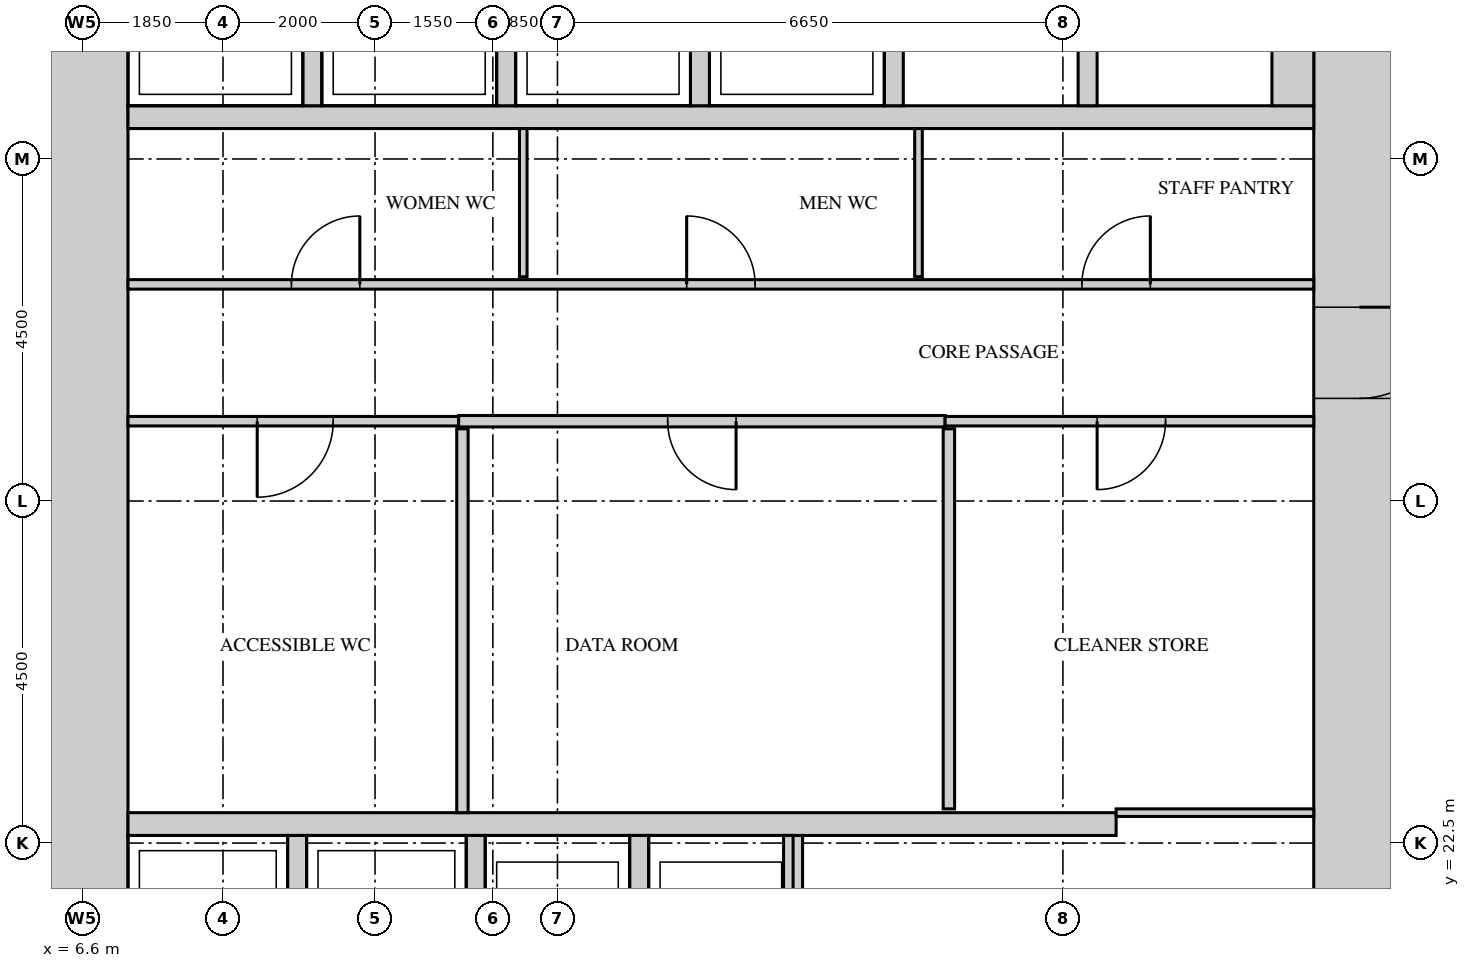
"""IFC4 building model, lengths in metres.
Left out: names, types, materials, properties, quantities, classifications, styles, units other than length and angle.
Written with IfcOpenShell. Run it as: python <this file> out.ifc"""

import sys

from ifc_helpers import new_model, si_unit, direction, frame, frame_2d, origin, place, context, subcontext, project, spatial, rectangle, extrude, source, transform, mapped, element, fill, save


model = new_model("IFC4")
c1 = context("Model", 3, precision=1e-05, world=origin(), true_north=direction((0.0, 1.0)))
c2 = subcontext(c1, "Body", "Model", "MODEL_VIEW")
j1 = project(units=[si_unit("LENGTHUNIT", "METRE"), si_unit("PLANEANGLEUNIT", "RADIAN")], contexts=[c1])
p1 = place(None, origin())
s1 = spatial("IfcSite", under=j1, at=p1, CompositionType="ELEMENT")
p2 = place(p1, origin())
s2 = spatial("IfcBuilding", under=s1, at=p2, CompositionType="ELEMENT")
p3 = place(p2, frame((0.0, 0.0, 51.0)))
s3 = spatial("IfcBuildingStorey", under=s2, at=p3, CompositionType="ELEMENT", Elevation=51.0)
m1 = source(origin(), c2, "Body", "SweptSolid", [
    extrude(rectangle(XDim=27.6, YDim=1.2, at=frame_2d((13.8, 0.0))), origin(), (0.0, 0.0, 1.0), 4.2),
])
p4 = place(p3, frame((23.4, 13.2, 0.0), z_axis=(0.0, 0.0, 1.0), x_axis=(0.0, 1.0, 0.0)))
e1 = element("IfcWall", 1, at=p4, inside=s3, PredefinedType="SHEAR", context=c2, shape_type="MappedRepresentation", body=[
    mapped(m1, transform((0.0, 0.0, 0.0))),
])
m2 = source(origin(), c2, "Body", "SweptSolid", [
    extrude(rectangle(XDim=1.8, YDim=2.1, at=frame_2d((0.9, 1.05))), frame((0.0, 0.61, 0.0), z_axis=(0.0, -1.0, 0.0), x_axis=(1.0, 0.0, 0.0)), (0.0, 0.0, 1.0), 1.22),
])
p5 = place(p4, frame((22.4, 0.0, 0.0)))
e2 = element("IfcOpeningElement", 2, at=p5, cuts=e1, PredefinedType="OPENING", context=c2, shape_type="MappedRepresentation", body=[
    mapped(m2, transform((0.0, 0.0, 0.0))),
])
m3 = source(origin(), c2, "Body", "SweptSolid", [
    extrude(rectangle(XDim=1.2, YDim=2.1, at=frame_2d((0.6, 1.05))), frame((0.0, 0.61, 0.0), z_axis=(0.0, -1.0, 0.0), x_axis=(1.0, 0.0, 0.0)), (0.0, 0.0, 1.0), 1.22),
])
p6 = place(p4, frame((15.15, 0.0, 0.0)))
e3 = element("IfcOpeningElement", 3, at=p6, cuts=e1, PredefinedType="OPENING", context=c2, shape_type="MappedRepresentation", body=[
    mapped(m3, transform((0.0, 0.0, 0.0))),
])
m4 = source(origin(), c2, "Body", "SweptSolid", [
    extrude(rectangle(XDim=0.9, YDim=2.1, at=frame_2d((0.45, 1.05))), frame((0.0, 0.61, 0.0), z_axis=(0.0, -1.0, 0.0), x_axis=(1.0, 0.0, 0.0)), (0.0, 0.0, 1.0), 1.22),
])
p7 = place(p4, frame((1.15, 0.0, 0.0)))
e4 = element("IfcOpeningElement", 4, at=p7, cuts=e1, PredefinedType="OPENING", context=c2, shape_type="MappedRepresentation", body=[
    mapped(m4, transform((0.0, 0.0, 0.0))),
])
p8 = place(p4, frame((4.35, 0.0, 0.0)))
e5 = element("IfcOpeningElement", 5, at=p8, cuts=e1, PredefinedType="OPENING", context=c2, shape_type="MappedRepresentation", body=[
    mapped(m4, transform((0.0, 0.0, 0.0))),
])
p9 = place(p4, frame((7.6, 0.0, 0.0)))
e6 = element("IfcOpeningElement", 6, at=p9, cuts=e1, PredefinedType="OPENING", context=c2, shape_type="MappedRepresentation", body=[
    mapped(m4, transform((0.0, 0.0, 0.0))),
])
p10 = place(p3, frame((6.6, 13.2, 0.0), z_axis=(0.0, 0.0, 1.0), x_axis=(0.0, 1.0, 0.0)))
e7 = element("IfcWall", 7, at=p10, inside=s3, PredefinedType="SHEAR", context=c2, shape_type="MappedRepresentation", body=[
    mapped(m1, transform((0.0, 0.0, 0.0))),
])
m5 = source(origin(), c2, "Body", "SweptSolid", [
    extrude(rectangle(XDim=13.0, YDim=0.3, at=frame_2d((6.5, 0.0))), origin(), (0.0, 0.0, 1.0), 4.2),
])
p11 = place(p3, frame((7.2, 22.75, 0.0), z_axis=(0.0, 0.0, 1.0), x_axis=(1.0, 0.0, 0.0)))
e8 = element("IfcWall", 8, at=p11, inside=s3, PredefinedType="STANDARD", context=c2, shape_type="MappedRepresentation", body=[
    mapped(m5, transform((0.0, 0.0, 0.0))),
])
m6 = source(origin(), c2, "Body", "SweptSolid", [
    extrude(rectangle(XDim=15.6, YDim=0.3, at=frame_2d((7.8, 0.0))), origin(), (0.0, 0.0, 1.0), 4.2),
])
p12 = place(p3, frame((7.2, 32.05, 0.0), z_axis=(0.0, 0.0, 1.0), x_axis=(1.0, 0.0, 0.0)))
e9 = element("IfcWall", 9, at=p12, inside=s3, PredefinedType="STANDARD", context=c2, shape_type="MappedRepresentation", body=[
    mapped(m6, transform((0.0, 0.0, 0.0))),
])
m7 = source(origin(), c2, "Body", "SweptSolid", [
    extrude(rectangle(XDim=3.1, YDim=0.25, at=frame_2d((1.55, 0.0))), origin(), (0.0, 0.0, 1.0), 4.2),
])
for number, where, z_axis, x_axis in (
    (10, (9.425, 19.5, 0.0), (0.0, 0.0, 1.0), (0.0, 1.0, 0.0)),
    (11, (11.775, 19.5, 0.0), (0.0, 0.0, 1.0), (0.0, 1.0, 0.0)),
    (12, (13.925, 19.5, 0.0), (0.0, 0.0, 1.0), (0.0, 1.0, 0.0)),
    (13, (15.95, 19.5, 0.0), (0.0, 0.0, 1.0), (0.0, 1.0, 0.0)),
):
    element("IfcWall", number, at=place(p3, frame(where, z_axis=z_axis, x_axis=x_axis)), inside=s3, PredefinedType="STANDARD", context=c2, shape_type="MappedRepresentation", body=[
        mapped(m7, transform((0.0, 0.0, 0.0))),
    ])
m8 = source(origin(), c2, "Body", "SweptSolid", [
    extrude(rectangle(XDim=2.4, YDim=0.25, at=frame_2d((1.2, 0.0))), origin(), (0.0, 0.0, 1.0), 4.2),
])
for number, where, z_axis, x_axis in (
    (14, (9.625, 32.2, 0.0), (0.0, 0.0, 1.0), (0.0, 1.0, 0.0)),
    (15, (12.175, 32.2, 0.0), (0.0, 0.0, 1.0), (0.0, 1.0, 0.0)),
    (16, (14.725, 32.2, 0.0), (0.0, 0.0, 1.0), (0.0, 1.0, 0.0)),
    (17, (17.275, 32.2, 0.0), (0.0, 0.0, 1.0), (0.0, 1.0, 0.0)),
    (18, (19.825, 32.2, 0.0), (0.0, 0.0, 1.0), (0.0, 1.0, 0.0)),
):
    element("IfcWall", number, at=place(p3, frame(where, z_axis=z_axis, x_axis=x_axis)), inside=s3, PredefinedType="STANDARD", context=c2, shape_type="MappedRepresentation", body=[
        mapped(m8, transform((0.0, 0.0, 0.0))),
    ])
m9 = source(origin(), c2, "Body", "SweptSolid", [
    extrude(rectangle(XDim=2.4, YDim=0.55, at=frame_2d((1.2, 0.0))), origin(), (0.0, 0.0, 1.0), 4.2),
])
p13 = place(p3, frame((22.525, 32.2, 0.0), z_axis=(0.0, 0.0, 1.0), x_axis=(0.0, 1.0, 0.0)))
e19 = element("IfcWall", 19, at=p13, inside=s3, PredefinedType="STANDARD", context=c2, shape_type="MappedRepresentation", body=[
    mapped(m9, transform((0.0, 0.0, 0.0))),
])
m10 = source(origin(), c2, "Body", "SweptSolid", [
    extrude(rectangle(XDim=5.05, YDim=0.15, at=frame_2d((2.525, 0.0))), origin(), (0.0, 0.0, 1.0), 4.3),
])
p14 = place(p3, frame((11.6, 22.9, 0.0), z_axis=(0.0, 0.0, 1.0), x_axis=(0.0, 1.0, 0.0)))
e20 = element("IfcWall", 20, at=p14, inside=s3, PredefinedType="PARTITIONING", context=c2, shape_type="MappedRepresentation", body=[
    mapped(m10, transform((0.0, 0.0, 0.0))),
])
m11 = source(origin(), c2, "Body", "SweptSolid", [
    extrude(rectangle(XDim=2.6, YDim=0.1, at=frame_2d((1.3, 0.0))), origin(), (0.0, 0.0, 1.0), 4.3),
])
p15 = place(p3, frame((20.2, 22.9, 0.0), z_axis=(0.0, 0.0, 1.0), x_axis=(1.0, 0.0, 0.0)))
e21 = element("IfcWall", 21, at=p15, inside=s3, PredefinedType="PARTITIONING", context=c2, shape_type="MappedRepresentation", body=[
    mapped(m11, transform((0.0, 0.0, 0.0))),
])
m12 = source(origin(), c2, "Body", "SweptSolid", [
    extrude(rectangle(XDim=5.0, YDim=0.15, at=frame_2d((2.5, 0.0))), origin(), (0.0, 0.0, 1.0), 4.3),
])
p16 = place(p3, frame((18.0, 22.95, 0.0), z_axis=(0.0, 0.0, 1.0), x_axis=(0.0, 1.0, 0.0)))
e22 = element("IfcWall", 22, at=p16, inside=s3, PredefinedType="PARTITIONING", context=c2, shape_type="MappedRepresentation", body=[
    mapped(m12, transform((0.0, 0.0, 0.0))),
])
m13 = source(origin(), c2, "Body", "SweptSolid", [
    extrude(rectangle(XDim=4.35, YDim=0.125, at=frame_2d((2.175, 0.0))), origin(), (0.0, 0.0, 1.0), 4.3),
])
p17 = place(p3, frame((7.2, 28.05, 0.0), z_axis=(0.0, 0.0, 1.0), x_axis=(1.0, 0.0, 0.0)))
e23 = element("IfcWall", 23, at=p17, inside=s3, PredefinedType="PARTITIONING", context=c2, shape_type="MappedRepresentation", body=[
    mapped(m13, transform((0.0, 0.0, 0.0))),
])
m14 = source(origin(), c2, "Body", "SweptSolid", [
    extrude(rectangle(XDim=1.0, YDim=2.1, at=frame_2d((0.5, 1.05))), frame((0.0, 0.073, 0.0), z_axis=(0.0, -1.0, 0.0), x_axis=(1.0, 0.0, 0.0)), (0.0, 0.0, 1.0), 0.145),
])
p18 = place(p17, frame((1.7, 0.0, 0.0)))
e24 = element("IfcOpeningElement", 24, at=p18, cuts=e23, PredefinedType="OPENING", context=c2, shape_type="MappedRepresentation", body=[
    mapped(m14, transform((0.0, 0.0, 0.0))),
])
m15 = source(origin(), c2, "Body", "SweptSolid", [
    extrude(rectangle(XDim=6.4, YDim=0.15, at=frame_2d((3.2, 0.0))), origin(), (0.0, 0.0, 1.0), 4.3),
])
p19 = place(p3, frame((11.55, 28.05, 0.0), z_axis=(0.0, 0.0, 1.0), x_axis=(1.0, 0.0, 0.0)))
e25 = element("IfcWall", 25, at=p19, inside=s3, PredefinedType="PARTITIONING", context=c2, shape_type="MappedRepresentation", body=[
    mapped(m15, transform((0.0, 0.0, 0.0))),
])
m16 = source(origin(), c2, "Body", "SweptSolid", [
    extrude(rectangle(XDim=0.9, YDim=2.1, at=frame_2d((0.45, 1.05))), frame((0.0, 0.085, 0.0), z_axis=(0.0, -1.0, 0.0), x_axis=(1.0, 0.0, 0.0)), (0.0, 0.0, 1.0), 0.17),
])
p20 = place(p19, frame((2.75, 0.0, 0.0)))
e26 = element("IfcOpeningElement", 26, at=p20, cuts=e25, PredefinedType="OPENING", context=c2, shape_type="MappedRepresentation", body=[
    mapped(m16, transform((0.0, 0.0, 0.0))),
])
m17 = source(origin(), c2, "Body", "SweptSolid", [
    extrude(rectangle(XDim=4.85, YDim=0.125, at=frame_2d((2.425, 0.0))), origin(), (0.0, 0.0, 1.0), 4.3),
])
p21 = place(p3, frame((17.95, 28.05, 0.0), z_axis=(0.0, 0.0, 1.0), x_axis=(1.0, 0.0, 0.0)))
e27 = element("IfcWall", 27, at=p21, inside=s3, PredefinedType="PARTITIONING", context=c2, shape_type="MappedRepresentation", body=[
    mapped(m17, transform((0.0, 0.0, 0.0))),
])
m18 = source(origin(), c2, "Body", "SweptSolid", [
    extrude(rectangle(XDim=0.9, YDim=2.1, at=frame_2d((0.45, 1.05))), frame((0.0, 0.073, 0.0), z_axis=(0.0, -1.0, 0.0), x_axis=(1.0, 0.0, 0.0)), (0.0, 0.0, 1.0), 0.145),
])
p22 = place(p21, frame((2.0, 0.0, 0.0)))
e28 = element("IfcOpeningElement", 28, at=p22, cuts=e27, PredefinedType="OPENING", context=c2, shape_type="MappedRepresentation", body=[
    mapped(m18, transform((0.0, 0.0, 0.0))),
])
m19 = source(origin(), c2, "Body", "SweptSolid", [
    extrude(rectangle(XDim=15.6, YDim=0.125, at=frame_2d((7.8, 0.0))), origin(), (0.0, 0.0, 1.0), 4.3),
])
p23 = place(p3, frame((7.2, 29.85, 0.0), z_axis=(0.0, 0.0, 1.0), x_axis=(1.0, 0.0, 0.0)))
e29 = element("IfcWall", 29, at=p23, inside=s3, PredefinedType="PARTITIONING", context=c2, shape_type="MappedRepresentation", body=[
    mapped(m19, transform((0.0, 0.0, 0.0))),
])
p24 = place(p23, frame((2.15, 0.0, 0.0)))
e30 = element("IfcOpeningElement", 30, at=p24, cuts=e29, PredefinedType="OPENING", context=c2, shape_type="MappedRepresentation", body=[
    mapped(m18, transform((0.0, 0.0, 0.0))),
])
p25 = place(p23, frame((7.35, 0.0, 0.0)))
e31 = element("IfcOpeningElement", 31, at=p25, cuts=e29, PredefinedType="OPENING", context=c2, shape_type="MappedRepresentation", body=[
    mapped(m18, transform((0.0, 0.0, 0.0))),
])
p26 = place(p23, frame((12.55, 0.0, 0.0)))
e32 = element("IfcOpeningElement", 32, at=p26, cuts=e29, PredefinedType="OPENING", context=c2, shape_type="MappedRepresentation", body=[
    mapped(m18, transform((0.0, 0.0, 0.0))),
])
m20 = source(origin(), c2, "Body", "SweptSolid", [
    extrude(rectangle(XDim=1.95, YDim=0.1, at=frame_2d((0.975, 0.0))), origin(), (0.0, 0.0, 1.0), 4.3),
])
for number, where, z_axis, x_axis in (
    (33, (12.4, 29.95, 0.0), (0.0, 0.0, 1.0), (0.0, 1.0, 0.0)),
    (34, (17.6, 29.95, 0.0), (0.0, 0.0, 1.0), (0.0, 1.0, 0.0)),
):
    element("IfcWall", number, at=place(p3, frame(where, z_axis=z_axis, x_axis=x_axis)), inside=s3, PredefinedType="PARTITIONING", context=c2, shape_type="MappedRepresentation", body=[
        mapped(m20, transform((0.0, 0.0, 0.0))),
    ])
m21 = source(origin(), c2, "Body", "SweptSolid", [
    extrude(rectangle(XDim=1.2, YDim=2.1, at=frame_2d((0.6, 1.05))), frame((0.0, 0.55, 0.0), z_axis=(0.0, -1.0, 0.0), x_axis=(1.0, 0.0, 0.0)), (0.0, 0.0, 1.0), 1.1),
])
p27 = place(p6, origin())
e35 = element("IfcDoor", 35, at=p27, inside=s3, OperationType="SINGLE_SWING_RIGHT", PredefinedType="DOOR", context=c2, shape_type="MappedRepresentation", body=[
    mapped(m21, transform((0.0, 0.0, 0.0))),
])
fill(e3, e35)
m22 = source(origin(), c2, "Body", "SweptSolid", [
    extrude(rectangle(XDim=0.9, YDim=2.1, at=frame_2d((0.45, 1.05))), frame((0.0, 0.025, 0.0), z_axis=(0.0, -1.0, 0.0), x_axis=(1.0, 0.0, 0.0)), (0.0, 0.0, 1.0), 0.05),
])
p28 = place(p24, origin())
e36 = element("IfcDoor", 36, at=p28, inside=s3, OperationType="SINGLE_SWING_LEFT", PredefinedType="DOOR", context=c2, shape_type="MappedRepresentation", body=[
    mapped(m22, transform((0.0, 0.0, 0.0))),
])
fill(e30, e36)
p29 = place(p25, origin())
e37 = element("IfcDoor", 37, at=p29, inside=s3, OperationType="SINGLE_SWING_RIGHT", PredefinedType="DOOR", context=c2, shape_type="MappedRepresentation", body=[
    mapped(m22, transform((0.0, 0.0, 0.0))),
])
fill(e31, e37)
p30 = place(p26, origin())
e38 = element("IfcDoor", 38, at=p30, inside=s3, OperationType="SINGLE_SWING_LEFT", PredefinedType="DOOR", context=c2, shape_type="MappedRepresentation", body=[
    mapped(m22, transform((0.0, 0.0, 0.0))),
])
fill(e32, e38)
m23 = source(origin(), c2, "Body", "SweptSolid", [
    extrude(rectangle(XDim=1.0, YDim=2.1, at=frame_2d((0.5, 1.05))), frame((0.0, 0.025, 0.0), z_axis=(0.0, -1.0, 0.0), x_axis=(1.0, 0.0, 0.0)), (0.0, 0.0, 1.0), 0.05),
])
p31 = place(p18, origin())
e39 = element("IfcDoor", 39, at=p31, inside=s3, OperationType="SINGLE_SWING_LEFT", PredefinedType="DOOR", context=c2, shape_type="MappedRepresentation", body=[
    mapped(m23, transform((0.0, 0.0, 0.0))),
])
fill(e24, e39)
p32 = place(p20, origin())
e40 = element("IfcDoor", 40, at=p32, inside=s3, OperationType="SINGLE_SWING_RIGHT", PredefinedType="DOOR", context=c2, shape_type="MappedRepresentation", body=[
    mapped(m22, transform((0.0, 0.0, 0.0))),
])
fill(e26, e40)
p33 = place(p22, origin())
e41 = element("IfcDoor", 41, at=p33, inside=s3, OperationType="SINGLE_SWING_LEFT", PredefinedType="DOOR", context=c2, shape_type="MappedRepresentation", body=[
    mapped(m22, transform((0.0, 0.0, 0.0))),
])
fill(e28, e41)
save(model, sys.argv[1])
